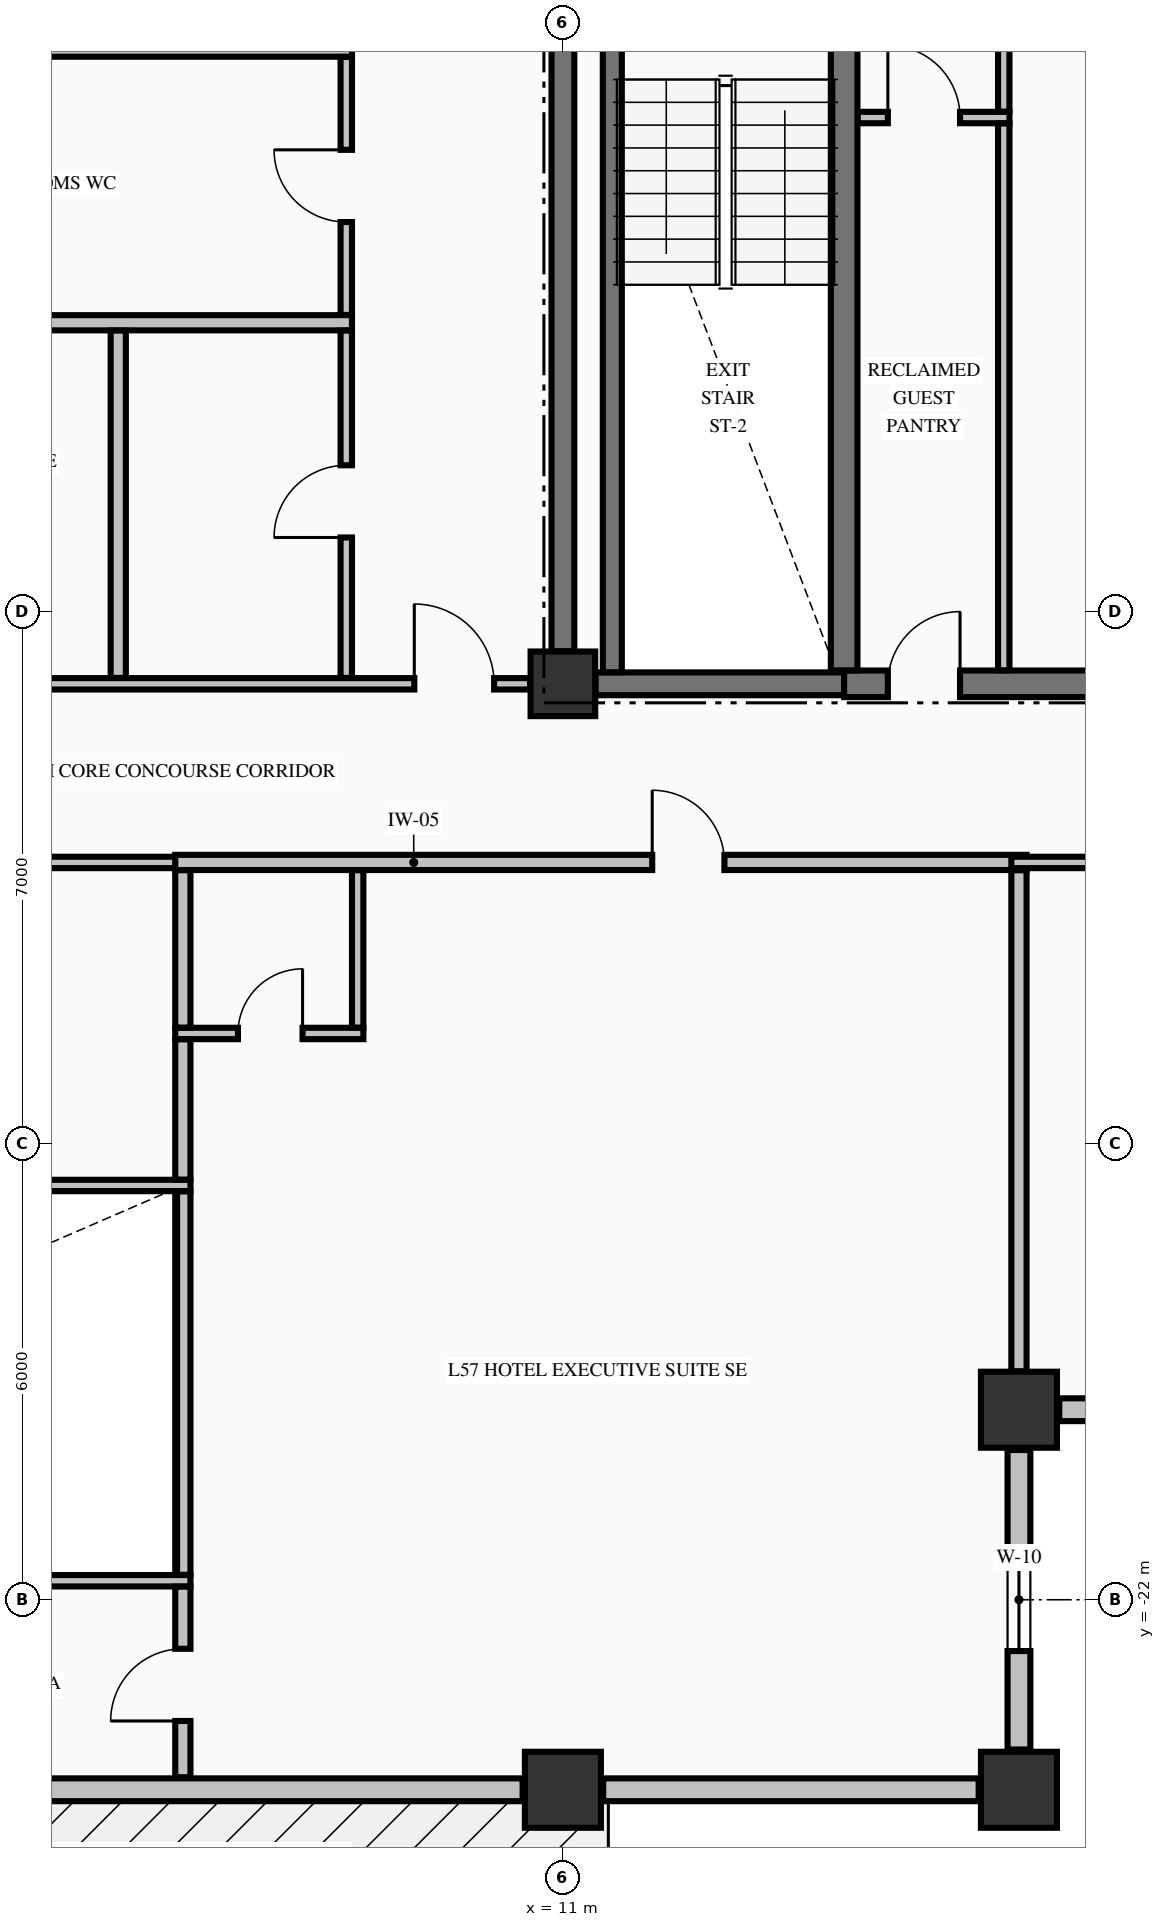
"""IFC4 building model, lengths in metres.
Left out: names, types, materials, properties, quantities, classifications, styles, units other than length and angle.
Written with IfcOpenShell. Run it as: python <this file> out.ifc"""

import sys

from ifc_helpers import new_model, si_unit, direction, frame, frame_2d, origin, origin_2d, place, context, subcontext, project, spatial, rectangle, extrude, element, fill, save


model = new_model("IFC4")
c1 = context("Model", 3, precision=1e-05, world=origin(), true_north=direction((0.0, 1.0)))
c2 = subcontext(c1, "Body", "Model", "MODEL_VIEW")
j1 = project(units=[si_unit("LENGTHUNIT", "METRE"), si_unit("PLANEANGLEUNIT", "RADIAN")], contexts=[c1])
p1 = place(None, origin())
s1 = spatial("IfcSite", under=j1, at=p1, CompositionType="ELEMENT")
p2 = place(p1, origin())
s2 = spatial("IfcBuilding", under=s1, at=p2, CompositionType="ELEMENT")
p3 = place(p2, frame((0.0, 0.0, 218.66)))
s3 = spatial("IfcBuildingStorey", under=s2, at=p3, CompositionType="ELEMENT", Elevation=218.66)
for number, where, z_axis, x_axis in (
    (1, (11.0, -24.5, -0.25), (0.0, 0.0, 1.0), (1.0, 0.0, 0.0)),
    (2, (17.0, -24.5, -0.25), (0.0, 0.0, 1.0), (1.0, 0.0, 0.0)),
    (3, (17.0, -19.5, -0.25), (0.0, 0.0, 1.0), (1.0, 0.0, 0.0)),
):
    element("IfcColumn", number, at=place(p3, frame(where, z_axis=z_axis, x_axis=x_axis)), inside=s3, PredefinedType="COLUMN", context=c2, shape_type="SweptSolid", body=[
        extrude(rectangle(XDim=1.0, YDim=1.0, at=origin_2d()), origin(), (0.0, 0.0, 1.0), 3.225),
    ])
p4 = place(p3, frame((11.0, -9.95, -0.25), z_axis=(0.0, 0.0, 1.0), x_axis=(1.0, 0.0, 0.0)))
e4 = element("IfcColumn", 4, at=p4, inside=s3, PredefinedType="COLUMN", context=c2, shape_type="SweptSolid", body=[
    extrude(rectangle(XDim=0.85, YDim=0.85, at=origin_2d()), origin(), (0.0, 0.0, 1.0), 3.225),
])
p5 = place(p3, frame((17.0, -23.97, 0.0), z_axis=(0.0, 0.0, 1.0), x_axis=(0.0, 1.0, 0.0)))
e5 = element("IfcWall", 5, at=p5, inside=s3, PredefinedType="STANDARD", context=c2, shape_type="SweptSolid", body=[
    extrude(rectangle(XDim=3.94, YDim=0.3, at=frame_2d((1.97, 0.0))), origin(), (0.0, 0.0, 1.0), 2.367),
])
p6 = place(p5, frame((1.295, 0.0, 0.68)))
e6 = element("IfcOpeningElement", 6, at=p6, cuts=e5, PredefinedType="OPENING", context=c2, shape_type="SweptSolid", body=[
    extrude(rectangle(XDim=1.35, YDim=1.42, at=frame_2d((0.675, 0.71))), frame((0.0, 0.16, 0.0), z_axis=(0.0, -1.0, 0.0), x_axis=(1.0, 0.0, 0.0)), (0.0, 0.0, 1.0), 0.32),
])
p7 = place(p3, frame((17.53, -19.5, 0.0), z_axis=(0.0, 0.0, 1.0), x_axis=(1.0, 0.0, 0.0)))
e7 = element("IfcWall", 7, at=p7, inside=s3, PredefinedType="STANDARD", context=c2, shape_type="SweptSolid", body=[
    extrude(rectangle(XDim=3.94, YDim=0.3, at=frame_2d((1.97, 0.0))), origin(), (0.0, 0.0, 1.0), 2.367),
])
p8 = place(p7, frame((1.295, 0.0, 0.68)))
e8 = element("IfcOpeningElement", 8, at=p8, cuts=e7, PredefinedType="OPENING", context=c2, shape_type="SweptSolid", body=[
    extrude(rectangle(XDim=1.35, YDim=1.42, at=frame_2d((0.675, 0.71))), frame((0.0, 0.16, 0.0), z_axis=(0.0, -1.0, 0.0), x_axis=(1.0, 0.0, 0.0)), (0.0, 0.0, 1.0), 0.32),
])
p9 = place(p3, frame((0.53, -24.5, 0.0), z_axis=(0.0, 0.0, 1.0), x_axis=(1.0, 0.0, 0.0)))
e9 = element("IfcWall", 9, at=p9, inside=s3, PredefinedType="STANDARD", context=c2, shape_type="SweptSolid", body=[
    extrude(rectangle(XDim=9.94, YDim=0.3, at=frame_2d((4.97, 0.0))), origin(), (0.0, 0.0, 1.0), 2.367),
])
p10 = place(p3, frame((11.53, -24.5, 0.0), z_axis=(0.0, 0.0, 1.0), x_axis=(1.0, 0.0, 0.0)))
e10 = element("IfcWall", 10, at=p10, inside=s3, PredefinedType="STANDARD", context=c2, shape_type="SweptSolid", body=[
    extrude(rectangle(XDim=4.94, YDim=0.3, at=frame_2d((2.47, 0.0))), origin(), (0.0, 0.0, 1.0), 2.367),
])
p11 = place(p3, frame((11.429, -9.95, 0.0), z_axis=(0.0, 0.0, 1.0), x_axis=(1.0, 0.0, 0.0)))
e11 = element("IfcWall", 11, at=p11, inside=s3, PredefinedType="SHEAR", context=c2, shape_type="SweptSolid", body=[
    extrude(rectangle(XDim=3.271, YDim=0.3, at=frame_2d((1.635, 0.0))), origin(), (0.0, 0.0, 1.0), 2.975),
])
p12 = place(p3, frame((14.7, -9.95, 0.0), z_axis=(0.0, 0.0, 1.0), x_axis=(1.0, 0.0, 0.0)))
e12 = element("IfcWall", 12, at=p12, inside=s3, PredefinedType="SHEAR", context=c2, shape_type="SweptSolid", body=[
    extrude(rectangle(XDim=4.871, YDim=0.35, at=frame_2d((2.436, 0.0))), origin(), (0.0, 0.0, 1.0), 2.975),
])
p13 = place(p12, frame((3.25, 0.0, 0.0)))
e13 = element("IfcOpeningElement", 13, at=p13, cuts=e12, PredefinedType="OPENING", context=c2, shape_type="SweptSolid", body=[
    extrude(rectangle(XDim=0.9, YDim=2.15, at=frame_2d((0.45, 1.075))), frame((0.0, 0.185, 0.0), z_axis=(0.0, -1.0, 0.0), x_axis=(1.0, 0.0, 0.0)), (0.0, 0.0, 1.0), 0.37),
])
p14 = place(p12, frame((0.575, 0.0, 0.0)))
e14 = element("IfcOpeningElement", 14, at=p14, cuts=e12, PredefinedType="OPENING", context=c2, shape_type="SweptSolid", body=[
    extrude(rectangle(XDim=0.95, YDim=2.15, at=frame_2d((0.475, 1.075))), frame((0.0, 0.185, 0.0), z_axis=(0.0, -1.0, 0.0), x_axis=(1.0, 0.0, 0.0)), (0.0, 0.0, 1.0), 0.37),
])
for number, where, z_axis, x_axis in (
    (15, (-6.1, -21.75, 0.0), (0.0, 0.0, 1.0), (1.0, 0.0, 0.0)),
    (16, (-6.1, -16.55, 0.0), (0.0, 0.0, 1.0), (1.0, 0.0, 0.0)),
):
    element("IfcWall", number, at=place(p3, frame(where, z_axis=z_axis, x_axis=x_axis)), inside=s3, PredefinedType="PARTITIONING", context=c2, shape_type="SweptSolid", body=[
        extrude(rectangle(XDim=12.2, YDim=0.15, at=frame_2d((6.1, 0.0))), origin(), (0.0, 0.0, 1.0), 2.975),
    ])
p15 = place(p3, frame((5.9, -14.55, 0.0), z_axis=(0.0, 0.0, 1.0), x_axis=(1.0, 0.0, 0.0)))
e17 = element("IfcWall", 17, at=p15, inside=s3, PredefinedType="PARTITIONING", context=c2, shape_type="SweptSolid", body=[
    extrude(rectangle(XDim=2.475, YDim=0.15, at=frame_2d((1.238, 0.0))), origin(), (0.0, 0.0, 1.0), 2.975),
])
p16 = place(p15, frame((0.825, 0.0, 0.0)))
e18 = element("IfcOpeningElement", 18, at=p16, cuts=e17, PredefinedType="OPENING", context=c2, shape_type="SweptSolid", body=[
    extrude(rectangle(XDim=0.85, YDim=2.1, at=frame_2d((0.425, 1.05))), frame((0.0, 0.085, 0.0), z_axis=(0.0, -1.0, 0.0), x_axis=(1.0, 0.0, 0.0)), (0.0, 0.0, 1.0), 0.17),
])
p17 = place(p3, frame((-6.1, -12.3, 0.0), z_axis=(0.0, 0.0, 1.0), x_axis=(1.0, 0.0, 0.0)))
e19 = element("IfcWall", 19, at=p17, inside=s3, PredefinedType="PARTITIONING", context=c2, shape_type="SweptSolid", body=[
    extrude(rectangle(XDim=12.2, YDim=0.15, at=frame_2d((6.1, 0.0))), origin(), (0.0, 0.0, 1.0), 2.975),
])
p18 = place(p17, frame((2.75, 0.0, 0.0)))
e20 = element("IfcOpeningElement", 20, at=p18, cuts=e19, PredefinedType="OPENING", context=c2, shape_type="SweptSolid", body=[
    extrude(rectangle(XDim=1.1, YDim=2.15, at=frame_2d((0.55, 1.075))), frame((0.0, 0.085, 0.0), z_axis=(0.0, -1.0, 0.0), x_axis=(1.0, 0.0, 0.0)), (0.0, 0.0, 1.0), 0.17),
])
p19 = place(p3, frame((5.9, -12.3, 0.0), z_axis=(0.0, 0.0, 1.0), x_axis=(1.0, 0.0, 0.0)))
e21 = element("IfcWall", 21, at=p19, inside=s3, PredefinedType="PARTITIONING", context=c2, shape_type="SweptSolid", body=[
    extrude(rectangle(XDim=11.2, YDim=0.2, at=frame_2d((5.6, 0.0))), origin(), (0.0, 0.0, 1.0), 2.975),
])
p20 = place(p19, frame((6.275, 0.0, 0.0)))
e22 = element("IfcOpeningElement", 22, at=p20, cuts=e21, PredefinedType="OPENING", context=c2, shape_type="SweptSolid", body=[
    extrude(rectangle(XDim=0.95, YDim=2.15, at=frame_2d((0.475, 1.075))), frame((0.0, 0.11, 0.0), z_axis=(0.0, -1.0, 0.0), x_axis=(1.0, 0.0, 0.0)), (0.0, 0.0, 1.0), 0.22),
])
p21 = place(p3, frame((16.9, -12.3, 0.0), z_axis=(0.0, 0.0, 1.0), x_axis=(1.0, 0.0, 0.0)))
e23 = element("IfcWall", 23, at=p21, inside=s3, PredefinedType="PARTITIONING", context=c2, shape_type="SweptSolid", body=[
    extrude(rectangle(XDim=3.175, YDim=0.15, at=frame_2d((1.587, 0.0))), origin(), (0.0, 0.0, 1.0), 2.975),
])
p22 = place(p3, frame((-10.569, -9.95, 0.0), z_axis=(0.0, 0.0, 1.0), x_axis=(1.0, 0.0, 0.0)))
e24 = element("IfcWall", 24, at=p22, inside=s3, PredefinedType="PARTITIONING", context=c2, shape_type="SweptSolid", body=[
    extrude(rectangle(XDim=21.138, YDim=0.15, at=frame_2d((10.569, 0.0))), origin(), (0.0, 0.0, 1.0), 2.975),
])
p23 = place(p22, frame((0.474, 0.0, 0.0)))
e25 = element("IfcOpeningElement", 25, at=p23, cuts=e24, PredefinedType="OPENING", context=c2, shape_type="SweptSolid", body=[
    extrude(rectangle(XDim=1.05, YDim=2.15, at=frame_2d((0.525, 1.075))), frame((0.0, 0.085, 0.0), z_axis=(0.0, -1.0, 0.0), x_axis=(1.0, 0.0, 0.0)), (0.0, 0.0, 1.0), 0.17),
])
p24 = place(p22, frame((19.614, 0.0, 0.0)))
e26 = element("IfcOpeningElement", 26, at=p24, cuts=e24, PredefinedType="OPENING", context=c2, shape_type="SweptSolid", body=[
    extrude(rectangle(XDim=1.05, YDim=2.15, at=frame_2d((0.525, 1.075))), frame((0.0, 0.085, 0.0), z_axis=(0.0, -1.0, 0.0), x_axis=(1.0, 0.0, 0.0)), (0.0, 0.0, 1.0), 0.17),
])
p25 = place(p22, frame((11.774, 0.0, 0.0)))
e27 = element("IfcOpeningElement", 27, at=p25, cuts=e24, PredefinedType="OPENING", context=c2, shape_type="SweptSolid", body=[
    extrude(rectangle(XDim=0.95, YDim=2.15, at=frame_2d((0.475, 1.075))), frame((0.0, 0.085, 0.0), z_axis=(0.0, -1.0, 0.0), x_axis=(1.0, 0.0, 0.0)), (0.0, 0.0, 1.0), 0.17),
])
p26 = place(p3, frame((-1.9, -5.2, 0.0), z_axis=(0.0, 0.0, 1.0), x_axis=(1.0, 0.0, 0.0)))
e28 = element("IfcWall", 28, at=p26, inside=s3, PredefinedType="PARTITIONING", context=c2, shape_type="SweptSolid", body=[
    extrude(rectangle(XDim=10.125, YDim=0.2, at=frame_2d((5.062, 0.0))), origin(), (0.0, 0.0, 1.0), 2.975),
])
p27 = place(p3, frame((14.878, -2.5, 0.0), z_axis=(0.0, 0.0, 1.0), x_axis=(1.0, 0.0, 0.0)))
e29 = element("IfcWall", 29, at=p27, inside=s3, PredefinedType="PARTITIONING", context=c2, shape_type="SweptSolid", body=[
    extrude(rectangle(XDim=1.997, YDim=0.15, at=frame_2d((0.999, 0.0))), origin(), (0.0, 0.0, 1.0), 2.975),
])
p28 = place(p27, frame((0.397, 0.0, 0.0)))
e30 = element("IfcOpeningElement", 30, at=p28, cuts=e29, PredefinedType="OPENING", context=c2, shape_type="SweptSolid", body=[
    extrude(rectangle(XDim=0.95, YDim=2.15, at=frame_2d((0.475, 1.075))), frame((0.0, 0.085, 0.0), z_axis=(0.0, -1.0, 0.0), x_axis=(1.0, 0.0, 0.0)), (0.0, 0.0, 1.0), 0.17),
])
p29 = place(p3, frame((-1.9, -1.6, 0.0), z_axis=(0.0, 0.0, 1.0), x_axis=(1.0, 0.0, 0.0)))
e31 = element("IfcWall", 31, at=p29, inside=s3, PredefinedType="PARTITIONING", context=c2, shape_type="SweptSolid", body=[
    extrude(rectangle(XDim=10.125, YDim=0.2, at=frame_2d((5.062, 0.0))), origin(), (0.0, 0.0, 1.0), 2.975),
])
p30 = place(p3, frame((11.0, -9.521, 0.0), z_axis=(0.0, 0.0, 1.0), x_axis=(0.0, 1.0, 0.0)))
e32 = element("IfcWall", 32, at=p30, inside=s3, PredefinedType="SHEAR", context=c2, shape_type="SweptSolid", body=[
    extrude(rectangle(XDim=9.092, YDim=0.3, at=frame_2d((4.546, 0.0))), origin(), (0.0, 0.0, 1.0), 2.975),
])
p31 = place(p3, frame((11.65, -9.798, 0.0), z_axis=(0.0, 0.0, 1.0), x_axis=(0.0, 1.0, 0.0)))
e33 = element("IfcWall", 33, at=p31, inside=s3, PredefinedType="SOLIDWALL", context=c2, shape_type="SweptSolid", body=[
    extrude(rectangle(XDim=9.396, YDim=0.25, at=frame_2d((4.698, 0.0))), origin(), (0.0, 0.0, 1.0), 2.975),
])
p32 = place(p3, frame((14.7, -9.773, 0.0), z_axis=(0.0, 0.0, 1.0), x_axis=(0.0, 1.0, 0.0)))
e34 = element("IfcWall", 34, at=p32, inside=s3, PredefinedType="SHEAR", context=c2, shape_type="SweptSolid", body=[
    extrude(rectangle(XDim=9.371, YDim=0.35, at=frame_2d((4.686, 0.0))), origin(), (0.0, 0.0, 1.0), 2.975),
])
p33 = place(p3, frame((5.15, -9.872, 0.0), z_axis=(0.0, 0.0, 1.0), x_axis=(0.0, 1.0, 0.0)))
e35 = element("IfcWall", 35, at=p33, inside=s3, PredefinedType="PARTITIONING", context=c2, shape_type="SweptSolid", body=[
    extrude(rectangle(XDim=4.569, YDim=0.2, at=frame_2d((2.285, 0.0))), origin(), (0.0, 0.0, 1.0), 2.975),
])
p34 = place(p3, frame((6.0, -24.335, 0.0), z_axis=(0.0, 0.0, 1.0), x_axis=(0.0, 1.0, 0.0)))
e36 = element("IfcWall", 36, at=p34, inside=s3, PredefinedType="PARTITIONING", context=c2, shape_type="SweptSolid", body=[
    extrude(rectangle(XDim=2.507, YDim=0.2, at=frame_2d((1.253, 0.0))), origin(), (0.0, 0.0, 1.0), 2.975),
])
p35 = place(p34, frame((0.74, 0.0, 0.0)))
e37 = element("IfcOpeningElement", 37, at=p35, cuts=e36, PredefinedType="OPENING", context=c2, shape_type="SweptSolid", body=[
    extrude(rectangle(XDim=0.95, YDim=2.15, at=frame_2d((0.475, 1.075))), frame((0.0, 0.11, 0.0), z_axis=(0.0, -1.0, 0.0), x_axis=(1.0, 0.0, 0.0)), (0.0, 0.0, 1.0), 0.22),
])
p36 = place(p3, frame((6.0, -21.672, 0.0), z_axis=(0.0, 0.0, 1.0), x_axis=(0.0, 1.0, 0.0)))
e38 = element("IfcWall", 38, at=p36, inside=s3, PredefinedType="PARTITIONING", context=c2, shape_type="SweptSolid", body=[
    extrude(rectangle(XDim=5.044, YDim=0.2, at=frame_2d((2.522, 0.0))), origin(), (0.0, 0.0, 1.0), 2.975),
])
p37 = place(p3, frame((6.0, -16.472, 0.0), z_axis=(0.0, 0.0, 1.0), x_axis=(0.0, 1.0, 0.0)))
e39 = element("IfcWall", 39, at=p37, inside=s3, PredefinedType="PARTITIONING", context=c2, shape_type="SweptSolid", body=[
    extrude(rectangle(XDim=1.844, YDim=0.2, at=frame_2d((0.922, 0.0))), origin(), (0.0, 0.0, 1.0), 2.975),
])
p38 = place(p3, frame((6.0, -14.472, 0.0), z_axis=(0.0, 0.0, 1.0), x_axis=(0.0, 1.0, 0.0)))
e40 = element("IfcWall", 40, at=p38, inside=s3, PredefinedType="PARTITIONING", context=c2, shape_type="SweptSolid", body=[
    extrude(rectangle(XDim=2.069, YDim=0.2, at=frame_2d((1.034, 0.0))), origin(), (0.0, 0.0, 1.0), 2.975),
])
p39 = place(p3, frame((8.15, -9.872, 0.0), z_axis=(0.0, 0.0, 1.0), x_axis=(0.0, 1.0, 0.0)))
e41 = element("IfcWall", 41, at=p39, inside=s3, PredefinedType="PARTITIONING", context=c2, shape_type="SweptSolid", body=[
    extrude(rectangle(XDim=4.569, YDim=0.15, at=frame_2d((2.285, 0.0))), origin(), (0.0, 0.0, 1.0), 2.975),
])
p40 = place(p39, frame((1.847, 0.0, 0.0)))
e42 = element("IfcOpeningElement", 42, at=p40, cuts=e41, PredefinedType="OPENING", context=c2, shape_type="SweptSolid", body=[
    extrude(rectangle(XDim=0.95, YDim=2.15, at=frame_2d((0.475, 1.075))), frame((0.0, 0.085, 0.0), z_axis=(0.0, -1.0, 0.0), x_axis=(1.0, 0.0, 0.0)), (0.0, 0.0, 1.0), 0.17),
])
p41 = place(p3, frame((8.15, -5.097, 0.0), z_axis=(0.0, 0.0, 1.0), x_axis=(0.0, 1.0, 0.0)))
e43 = element("IfcWall", 43, at=p41, inside=s3, PredefinedType="PARTITIONING", context=c2, shape_type="SweptSolid", body=[
    extrude(rectangle(XDim=3.394, YDim=0.15, at=frame_2d((1.697, 0.0))), origin(), (0.0, 0.0, 1.0), 2.975),
])
p42 = place(p41, frame((1.222, 0.0, 0.0)))
e44 = element("IfcOpeningElement", 44, at=p42, cuts=e43, PredefinedType="OPENING", context=c2, shape_type="SweptSolid", body=[
    extrude(rectangle(XDim=0.95, YDim=2.15, at=frame_2d((0.475, 1.075))), frame((0.0, 0.085, 0.0), z_axis=(0.0, -1.0, 0.0), x_axis=(1.0, 0.0, 0.0)), (0.0, 0.0, 1.0), 0.17),
])
p43 = place(p3, frame((8.3, -14.472, 0.0), z_axis=(0.0, 0.0, 1.0), x_axis=(0.0, 1.0, 0.0)))
e45 = element("IfcWall", 45, at=p43, inside=s3, PredefinedType="PARTITIONING", context=c2, shape_type="SweptSolid", body=[
    extrude(rectangle(XDim=2.069, YDim=0.15, at=frame_2d((1.034, 0.0))), origin(), (0.0, 0.0, 1.0), 2.975),
])
p44 = place(p3, frame((16.8, -9.772, 0.0), z_axis=(0.0, 0.0, 1.0), x_axis=(0.0, 1.0, 0.0)))
e46 = element("IfcWall", 46, at=p44, inside=s3, PredefinedType="PARTITIONING", context=c2, shape_type="SweptSolid", body=[
    extrude(rectangle(XDim=7.194, YDim=0.15, at=frame_2d((3.597, 0.0))), origin(), (0.0, 0.0, 1.0), 2.975),
])
p45 = place(p3, frame((16.8, -2.422, 0.0), z_axis=(0.0, 0.0, 1.0), x_axis=(0.0, 1.0, 0.0)))
e47 = element("IfcWall", 47, at=p45, inside=s3, PredefinedType="PARTITIONING", context=c2, shape_type="SweptSolid", body=[
    extrude(rectangle(XDim=7.144, YDim=0.15, at=frame_2d((3.572, 0.0))), origin(), (0.0, 0.0, 1.0), 2.975),
])
p46 = place(p3, frame((17.0, -18.994, 0.0), z_axis=(0.0, 0.0, 1.0), x_axis=(0.0, 1.0, 0.0)))
e48 = element("IfcWall", 48, at=p46, inside=s3, PredefinedType="PARTITIONING", context=c2, shape_type="SweptSolid", body=[
    extrude(rectangle(XDim=6.591, YDim=0.2, at=frame_2d((3.295, 0.0))), origin(), (0.0, 0.0, 1.0), 2.975),
])
p47 = place(p6, origin())
e49 = element("IfcWindow", 49, at=p47, inside=s3, PartitioningType="SINGLE_PANEL", PredefinedType="WINDOW", context=c2, shape_type="SweptSolid", body=[
    extrude(rectangle(XDim=1.35, YDim=1.42, at=frame_2d((0.675, 0.71))), frame((0.0, 0.03, 0.0), z_axis=(0.0, -1.0, 0.0), x_axis=(1.0, 0.0, 0.0)), (0.0, 0.0, 1.0), 0.06),
])
fill(e6, e49)
p48 = place(p14, origin())
e50 = element("IfcDoor", 50, at=p48, inside=s3, OperationType="SINGLE_SWING_RIGHT", PredefinedType="DOOR", context=c2, shape_type="SweptSolid", body=[
    extrude(rectangle(XDim=0.95, YDim=2.15, at=frame_2d((0.475, 1.075))), frame((0.0, 0.025, 0.0), z_axis=(0.0, -1.0, 0.0), x_axis=(1.0, 0.0, 0.0)), (0.0, 0.0, 1.0), 0.05),
])
fill(e14, e50)
p49 = place(p28, origin())
e51 = element("IfcDoor", 51, at=p49, inside=s3, OperationType="SINGLE_SWING_LEFT", PredefinedType="DOOR", context=c2, shape_type="SweptSolid", body=[
    extrude(rectangle(XDim=0.95, YDim=2.15, at=frame_2d((0.475, 1.075))), frame((0.0, 0.025, 0.0), z_axis=(0.0, -1.0, 0.0), x_axis=(1.0, 0.0, 0.0)), (0.0, 0.0, 1.0), 0.05),
])
fill(e30, e51)
p50 = place(p24, origin())
e52 = element("IfcDoor", 52, at=p50, inside=s3, OperationType="SINGLE_SWING_LEFT", PredefinedType="DOOR", context=c2, shape_type="SweptSolid", body=[
    extrude(rectangle(XDim=1.05, YDim=2.15, at=frame_2d((0.525, 1.075))), frame((0.0, 0.025, 0.0), z_axis=(0.0, -1.0, 0.0), x_axis=(1.0, 0.0, 0.0)), (0.0, 0.0, 1.0), 0.05),
])
fill(e26, e52)
p51 = place(p35, origin())
e53 = element("IfcDoor", 53, at=p51, inside=s3, OperationType="SINGLE_SWING_LEFT", PredefinedType="DOOR", context=c2, shape_type="SweptSolid", body=[
    extrude(rectangle(XDim=0.95, YDim=2.15, at=frame_2d((0.475, 1.075))), frame((0.0, 0.025, 0.0), z_axis=(0.0, -1.0, 0.0), x_axis=(1.0, 0.0, 0.0)), (0.0, 0.0, 1.0), 0.05),
])
fill(e37, e53)
p52 = place(p20, origin())
e54 = element("IfcDoor", 54, at=p52, inside=s3, OperationType="SINGLE_SWING_LEFT", PredefinedType="DOOR", context=c2, shape_type="SweptSolid", body=[
    extrude(rectangle(XDim=0.95, YDim=2.15, at=frame_2d((0.475, 1.075))), frame((0.0, 0.025, 0.0), z_axis=(0.0, -1.0, 0.0), x_axis=(1.0, 0.0, 0.0)), (0.0, 0.0, 1.0), 0.05),
])
fill(e22, e54)
p53 = place(p16, origin())
e55 = element("IfcDoor", 55, at=p53, inside=s3, OperationType="SINGLE_SWING_RIGHT", PredefinedType="DOOR", context=c2, shape_type="SweptSolid", body=[
    extrude(rectangle(XDim=0.85, YDim=2.1, at=frame_2d((0.425, 1.05))), frame((0.0, 0.025, 0.0), z_axis=(0.0, -1.0, 0.0), x_axis=(1.0, 0.0, 0.0)), (0.0, 0.0, 1.0), 0.05),
])
fill(e18, e55)
p54 = place(p42, origin())
e56 = element("IfcDoor", 56, at=p54, inside=s3, OperationType="SINGLE_SWING_RIGHT", PredefinedType="DOOR", context=c2, shape_type="SweptSolid", body=[
    extrude(rectangle(XDim=0.95, YDim=2.15, at=frame_2d((0.475, 1.075))), frame((0.0, 0.025, 0.0), z_axis=(0.0, -1.0, 0.0), x_axis=(1.0, 0.0, 0.0)), (0.0, 0.0, 1.0), 0.05),
])
fill(e44, e56)
p55 = place(p40, origin())
e57 = element("IfcDoor", 57, at=p55, inside=s3, OperationType="SINGLE_SWING_LEFT", PredefinedType="DOOR", context=c2, shape_type="SweptSolid", body=[
    extrude(rectangle(XDim=0.95, YDim=2.15, at=frame_2d((0.475, 1.075))), frame((0.0, 0.025, 0.0), z_axis=(0.0, -1.0, 0.0), x_axis=(1.0, 0.0, 0.0)), (0.0, 0.0, 1.0), 0.05),
])
fill(e42, e57)
save(model, sys.argv[1])
